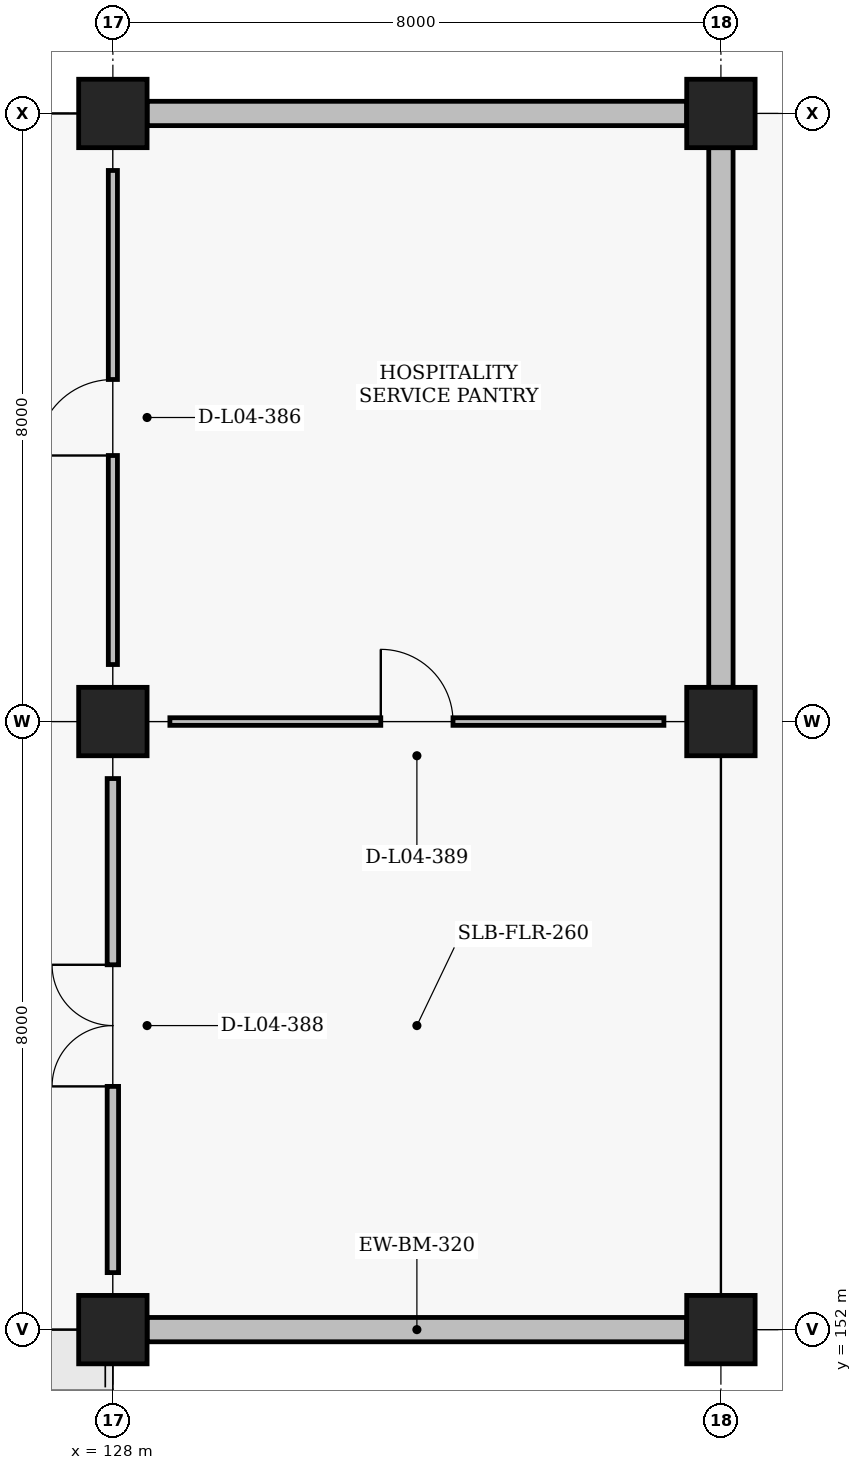
"""IFC4 building model, lengths in metres.
Left out: names, types, materials, properties, quantities, classifications, styles, units other than length and angle.
Written with IfcOpenShell. Run it as: python <this file> out.ifc"""

import sys

from ifc_helpers import new_model, si_unit, direction, frame, frame_2d, origin, origin_2d, place, context, subcontext, project, spatial, rectangle, extrude, element, fill, save


model = new_model("IFC4")
c1 = context("Model", 3, precision=1e-05, world=origin(), true_north=direction((0.0, 1.0)))
c2 = subcontext(c1, "Body", "Model", "MODEL_VIEW")
j1 = project(units=[si_unit("LENGTHUNIT", "METRE"), si_unit("PLANEANGLEUNIT", "RADIAN")], contexts=[c1])
p1 = place(None, origin())
s1 = spatial("IfcSite", under=j1, at=p1, CompositionType="ELEMENT")
p2 = place(p1, origin())
s2 = spatial("IfcBuilding", under=s1, at=p2, CompositionType="ELEMENT")
p3 = place(p2, frame((0.0, 0.0, 14.4)))
s3 = spatial("IfcBuildingStorey", under=s2, at=p3, CompositionType="ELEMENT", Elevation=14.4)
for number, where, z_axis, x_axis in (
    (1, (128.0, 152.0, 0.0), (0.0, 0.0, 1.0), (1.0, 0.0, 0.0)),
    (2, (128.0, 160.0, 0.0), (0.0, 0.0, 1.0), (1.0, 0.0, 0.0)),
    (3, (128.0, 168.0, 0.0), (0.0, 0.0, 1.0), (1.0, 0.0, 0.0)),
    (4, (136.0, 152.0, 0.0), (0.0, 0.0, 1.0), (1.0, 0.0, 0.0)),
    (5, (136.0, 160.0, 0.0), (0.0, 0.0, 1.0), (1.0, 0.0, 0.0)),
    (6, (136.0, 168.0, 0.0), (0.0, 0.0, 1.0), (1.0, 0.0, 0.0)),
):
    element("IfcColumn", number, at=place(p3, frame(where, z_axis=z_axis, x_axis=x_axis)), inside=s3, PredefinedType="COLUMN", context=c2, shape_type="SweptSolid", body=[
        extrude(rectangle(XDim=0.9, YDim=0.9, at=origin_2d()), origin(), (0.0, 0.0, 1.0), 4.2),
    ])
for number, where, z_axis, x_axis in (
    (7, (128.45, 152.0, 0.0), (0.0, 0.0, 1.0), (1.0, 0.0, 0.0)),
    (8, (128.45, 168.0, 0.0), (0.0, 0.0, 1.0), (1.0, 0.0, 0.0)),
    (9, (136.0, 160.45, 0.0), (0.0, 0.0, 1.0), (0.0, 1.0, 0.0)),
):
    element("IfcWall", number, at=place(p3, frame(where, z_axis=z_axis, x_axis=x_axis)), inside=s3, PredefinedType="SOLIDWALL", context=c2, shape_type="SweptSolid", body=[
        extrude(rectangle(XDim=7.1, YDim=0.32, at=frame_2d((3.55, 0.0))), origin(), (0.0, 0.0, 1.0), 3.33),
    ])
p4 = place(p3, frame((128.0, 160.75, 0.0), z_axis=(0.0, 0.0, 1.0), x_axis=(0.0, 1.0, 0.0)))
e10 = element("IfcWall", 10, at=p4, inside=s3, PredefinedType="PARTITIONING", context=c2, shape_type="SweptSolid", body=[
    extrude(rectangle(XDim=6.5, YDim=0.12, at=frame_2d((3.25, 0.0))), origin(), (0.0, 0.0, 1.0), 3.33),
])
p5 = place(p4, frame((2.75, 0.0, 0.0)))
e11 = element("IfcOpeningElement", 11, at=p5, cuts=e10, PredefinedType="OPENING", context=c2, shape_type="SweptSolid", body=[
    extrude(rectangle(XDim=1.0, YDim=2.1, at=frame_2d((0.5, 1.05))), frame((0.0, 0.07, 0.0), z_axis=(0.0, -1.0, 0.0), x_axis=(1.0, 0.0, 0.0)), (0.0, 0.0, 1.0), 0.14),
])
p6 = place(p3, frame((128.0, 152.75, 0.0), z_axis=(0.0, 0.0, 1.0), x_axis=(0.0, 1.0, 0.0)))
e12 = element("IfcWall", 12, at=p6, inside=s3, PredefinedType="PARTITIONING", context=c2, shape_type="SweptSolid", body=[
    extrude(rectangle(XDim=6.5, YDim=0.15, at=frame_2d((3.25, 0.0))), origin(), (0.0, 0.0, 1.0), 3.33),
])
p7 = place(p6, frame((2.45, 0.0, 0.0)))
e13 = element("IfcOpeningElement", 13, at=p7, cuts=e12, PredefinedType="OPENING", context=c2, shape_type="SweptSolid", body=[
    extrude(rectangle(XDim=1.6, YDim=2.2, at=frame_2d((0.8, 1.1))), frame((0.0, 0.085, 0.0), z_axis=(0.0, -1.0, 0.0), x_axis=(1.0, 0.0, 0.0)), (0.0, 0.0, 1.0), 0.17),
])
p8 = place(p3, frame((128.75, 160.0, 0.0), z_axis=(0.0, 0.0, 1.0), x_axis=(1.0, 0.0, 0.0)))
e14 = element("IfcWall", 14, at=p8, inside=s3, PredefinedType="PARTITIONING", context=c2, shape_type="SweptSolid", body=[
    extrude(rectangle(XDim=6.5, YDim=0.1, at=frame_2d((3.25, 0.0))), origin(), (0.0, 0.0, 1.0), 3.43),
])
p9 = place(p8, frame((2.775, 0.0, 0.0)))
e15 = element("IfcOpeningElement", 15, at=p9, cuts=e14, PredefinedType="OPENING", context=c2, shape_type="SweptSolid", body=[
    extrude(rectangle(XDim=0.95, YDim=2.1, at=frame_2d((0.475, 1.05))), frame((0.0, 0.06, 0.0), z_axis=(0.0, -1.0, 0.0), x_axis=(1.0, 0.0, 0.0)), (0.0, 0.0, 1.0), 0.12),
])
p10 = place(p5, origin())
e16 = element("IfcDoor", 16, at=p10, inside=s3, OperationType="SINGLE_SWING_LEFT", PredefinedType="DOOR", context=c2, shape_type="SweptSolid", body=[
    extrude(rectangle(XDim=1.0, YDim=2.1, at=frame_2d((0.5, 1.05))), frame((0.0, 0.025, 0.0), z_axis=(0.0, -1.0, 0.0), x_axis=(1.0, 0.0, 0.0)), (0.0, 0.0, 1.0), 0.05),
])
fill(e11, e16)
p11 = place(p7, origin())
e17 = element("IfcDoor", 17, at=p11, inside=s3, OperationType="DOUBLE_SWING_LEFT", PredefinedType="DOOR", context=c2, shape_type="SweptSolid", body=[
    extrude(rectangle(XDim=1.6, YDim=2.2, at=frame_2d((0.8, 1.1))), frame((0.0, 0.025, 0.0), z_axis=(0.0, -1.0, 0.0), x_axis=(1.0, 0.0, 0.0)), (0.0, 0.0, 1.0), 0.05),
])
fill(e13, e17)
p12 = place(p9, origin())
e18 = element("IfcDoor", 18, at=p12, inside=s3, OperationType="SINGLE_SWING_LEFT", PredefinedType="DOOR", context=c2, shape_type="SweptSolid", body=[
    extrude(rectangle(XDim=0.95, YDim=2.1, at=frame_2d((0.475, 1.05))), frame((0.0, 0.025, 0.0), z_axis=(0.0, -1.0, 0.0), x_axis=(1.0, 0.0, 0.0)), (0.0, 0.0, 1.0), 0.05),
])
fill(e15, e18)
save(model, sys.argv[1])
